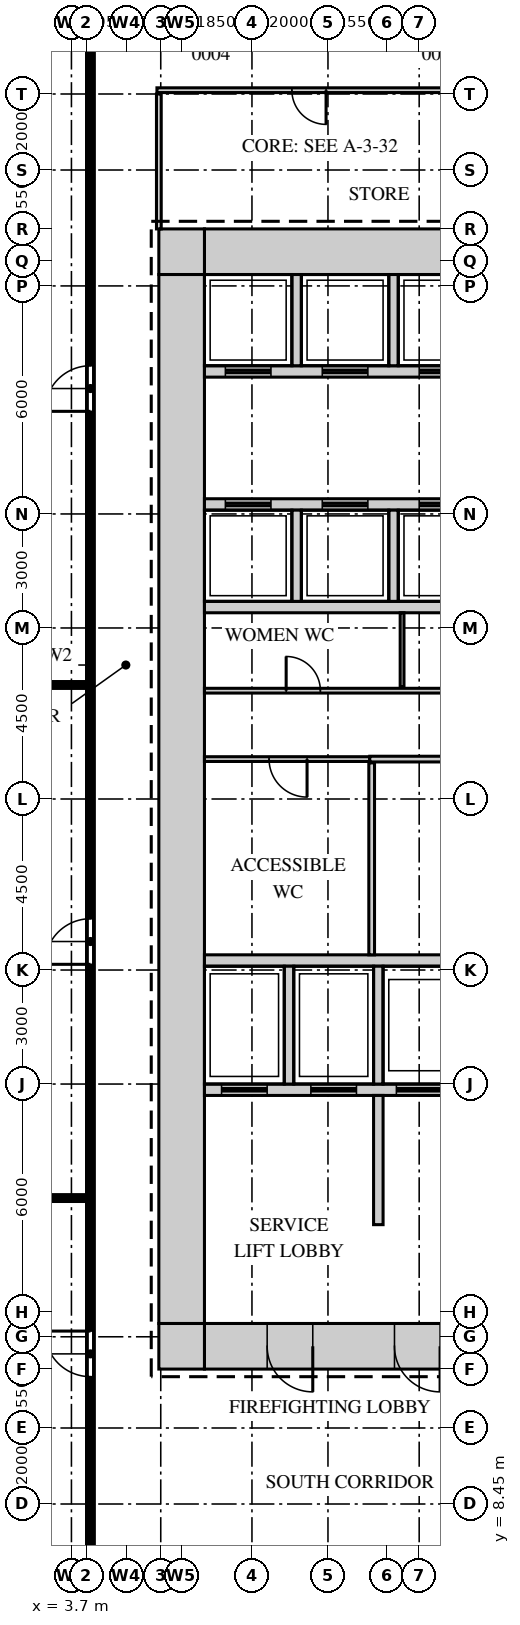
"""IFC4 building model, lengths in metres.
Left out: names, types, materials, properties, quantities, classifications, styles, units other than length and angle.
Written with IfcOpenShell. Run it as: python <this file> out.ifc"""

import sys

from ifc_helpers import new_model, si_unit, direction, frame, frame_2d, origin, place, context, subcontext, project, spatial, rectangle, extrude, source, transform, mapped, element, fill, save


model = new_model("IFC4")
c1 = context("Model", 3, precision=1e-05, world=origin(), true_north=direction((0.0, 1.0)))
c2 = subcontext(c1, "Body", "Model", "MODEL_VIEW")
j1 = project(units=[si_unit("LENGTHUNIT", "METRE"), si_unit("PLANEANGLEUNIT", "RADIAN")], contexts=[c1])
p1 = place(None, origin())
s1 = spatial("IfcSite", under=j1, at=p1, CompositionType="ELEMENT")
p2 = place(p1, origin())
s2 = spatial("IfcBuilding", under=s1, at=p2, CompositionType="ELEMENT")
p3 = place(p2, frame((0.0, 0.0, 7.5)))
s3 = spatial("IfcBuildingStorey", under=s2, at=p3, CompositionType="ELEMENT", Elevation=7.5)
m1 = source(origin(), c2, "Body", "SweptSolid", [
    extrude(rectangle(XDim=6.7, YDim=1.2, at=frame_2d((3.35, 0.0))), origin(), (0.0, 0.0, 1.0), 5.2),
])
p4 = place(p3, frame((7.2, 41.4, 0.0), z_axis=(0.0, 0.0, 1.0), x_axis=(1.0, 0.0, 0.0)))
e1 = element("IfcWall", 1, at=p4, inside=s3, PredefinedType="SHEAR", context=c2, shape_type="MappedRepresentation", body=[
    mapped(m1, transform((0.0, 0.0, 0.0))),
])
m2 = source(origin(), c2, "Body", "SweptSolid", [
    extrude(rectangle(XDim=1.2, YDim=1.2, at=frame_2d((0.6, 0.0))), origin(), (0.0, 0.0, 1.0), 5.2),
])
p5 = place(p3, frame((6.0, 41.4, 0.0), z_axis=(0.0, 0.0, 1.0), x_axis=(1.0, 0.0, 0.0)))
e2 = element("IfcWall", 2, at=p5, inside=s3, PredefinedType="SHEAR", context=c2, shape_type="MappedRepresentation", body=[
    mapped(m2, transform((0.0, 0.0, 0.0))),
])
p6 = place(p3, frame((7.2, 12.6, 0.0), z_axis=(0.0, 0.0, 1.0), x_axis=(1.0, 0.0, 0.0)))
e3 = element("IfcWall", 3, at=p6, inside=s3, PredefinedType="SHEAR", context=c2, shape_type="MappedRepresentation", body=[
    mapped(m1, transform((0.0, 0.0, 0.0))),
])
m3 = source(origin(), c2, "Body", "SweptSolid", [
    extrude(rectangle(XDim=1.2, YDim=2.1, at=frame_2d((0.6, 1.05))), frame((0.0, 0.61, 0.0), z_axis=(0.0, -1.0, 0.0), x_axis=(1.0, 0.0, 0.0)), (0.0, 0.0, 1.0), 1.22),
])
p7 = place(p6, frame((5.0, 0.0, 0.0)))
e4 = element("IfcOpeningElement", 4, at=p7, cuts=e3, PredefinedType="OPENING", context=c2, shape_type="MappedRepresentation", body=[
    mapped(m3, transform((0.0, 0.0, 0.0))),
])
p8 = place(p6, frame((1.65, 0.0, 0.0)))
e5 = element("IfcOpeningElement", 5, at=p8, cuts=e3, PredefinedType="OPENING", context=c2, shape_type="MappedRepresentation", body=[
    mapped(m3, transform((0.0, 0.0, 0.0))),
])
p9 = place(p3, frame((6.0, 12.6, 0.0), z_axis=(0.0, 0.0, 1.0), x_axis=(1.0, 0.0, 0.0)))
e6 = element("IfcWall", 6, at=p9, inside=s3, PredefinedType="SHEAR", context=c2, shape_type="MappedRepresentation", body=[
    mapped(m2, transform((0.0, 0.0, 0.0))),
])
m4 = source(origin(), c2, "Body", "SweptSolid", [
    extrude(rectangle(XDim=27.6, YDim=1.2, at=frame_2d((13.8, 0.0))), origin(), (0.0, 0.0, 1.0), 5.2),
])
p10 = place(p3, frame((6.6, 13.2, 0.0), z_axis=(0.0, 0.0, 1.0), x_axis=(0.0, 1.0, 0.0)))
e7 = element("IfcWall", 7, at=p10, inside=s3, PredefinedType="SHEAR", context=c2, shape_type="MappedRepresentation", body=[
    mapped(m4, transform((0.0, 0.0, 0.0))),
])
m5 = source(origin(), c2, "Body", "SweptSolid", [
    extrude(rectangle(XDim=13.0, YDim=0.3, at=frame_2d((6.5, 0.0))), origin(), (0.0, 0.0, 1.0), 5.2),
])
p11 = place(p3, frame((7.2, 22.75, 0.0), z_axis=(0.0, 0.0, 1.0), x_axis=(1.0, 0.0, 0.0)))
e8 = element("IfcWall", 8, at=p11, inside=s3, PredefinedType="STANDARD", context=c2, shape_type="MappedRepresentation", body=[
    mapped(m5, transform((0.0, 0.0, 0.0))),
])
m6 = source(origin(), c2, "Body", "SweptSolid", [
    extrude(rectangle(XDim=8.875, YDim=0.3, at=frame_2d((4.438, 0.0))), origin(), (0.0, 0.0, 1.0), 5.2),
])
p12 = place(p3, frame((7.2, 19.35, 0.0), z_axis=(0.0, 0.0, 1.0), x_axis=(1.0, 0.0, 0.0)))
e9 = element("IfcWall", 9, at=p12, inside=s3, PredefinedType="STANDARD", context=c2, shape_type="MappedRepresentation", body=[
    mapped(m6, transform((0.0, 0.0, 0.0))),
])
m7 = source(origin(), c2, "Body", "SweptSolid", [
    extrude(rectangle(XDim=1.2, YDim=2.1, at=frame_2d((0.6, 1.05))), frame((0.0, 0.16, 0.0), z_axis=(0.0, -1.0, 0.0), x_axis=(1.0, 0.0, 0.0)), (0.0, 0.0, 1.0), 0.32),
])
p13 = place(p12, frame((0.45, 0.0, 0.0)))
e10 = element("IfcOpeningElement", 10, at=p13, cuts=e9, PredefinedType="OPENING", context=c2, shape_type="MappedRepresentation", body=[
    mapped(m7, transform((0.0, 0.0, 0.0))),
])
p14 = place(p12, frame((2.8, 0.0, 0.0)))
e11 = element("IfcOpeningElement", 11, at=p14, cuts=e9, PredefinedType="OPENING", context=c2, shape_type="MappedRepresentation", body=[
    mapped(m7, transform((0.0, 0.0, 0.0))),
])
p15 = place(p12, frame((5.05, 0.0, 0.0)))
e12 = element("IfcOpeningElement", 12, at=p15, cuts=e9, PredefinedType="OPENING", context=c2, shape_type="MappedRepresentation", body=[
    mapped(m7, transform((0.0, 0.0, 0.0))),
])
p16 = place(p12, frame((7.2, 0.0, 0.0)))
e13 = element("IfcOpeningElement", 13, at=p16, cuts=e9, PredefinedType="OPENING", context=c2, shape_type="MappedRepresentation", body=[
    mapped(m7, transform((0.0, 0.0, 0.0))),
])
m8 = source(origin(), c2, "Body", "SweptSolid", [
    extrude(rectangle(XDim=15.6, YDim=0.3, at=frame_2d((7.8, 0.0))), origin(), (0.0, 0.0, 1.0), 5.2),
])
p17 = place(p3, frame((7.2, 32.05, 0.0), z_axis=(0.0, 0.0, 1.0), x_axis=(1.0, 0.0, 0.0)))
e14 = element("IfcWall", 14, at=p17, inside=s3, PredefinedType="STANDARD", context=c2, shape_type="MappedRepresentation", body=[
    mapped(m8, transform((0.0, 0.0, 0.0))),
])
p18 = place(p3, frame((7.2, 38.25, 0.0), z_axis=(0.0, 0.0, 1.0), x_axis=(1.0, 0.0, 0.0)))
e15 = element("IfcWall", 15, at=p18, inside=s3, PredefinedType="STANDARD", context=c2, shape_type="MappedRepresentation", body=[
    mapped(m8, transform((0.0, 0.0, 0.0))),
])
p19 = place(p18, frame((0.55, 0.0, 0.0)))
e16 = element("IfcOpeningElement", 16, at=p19, cuts=e15, PredefinedType="OPENING", context=c2, shape_type="MappedRepresentation", body=[
    mapped(m7, transform((0.0, 0.0, 0.0))),
])
p20 = place(p18, frame((3.1, 0.0, 0.0)))
e17 = element("IfcOpeningElement", 17, at=p20, cuts=e15, PredefinedType="OPENING", context=c2, shape_type="MappedRepresentation", body=[
    mapped(m7, transform((0.0, 0.0, 0.0))),
])
p21 = place(p18, frame((5.65, 0.0, 0.0)))
e18 = element("IfcOpeningElement", 18, at=p21, cuts=e15, PredefinedType="OPENING", context=c2, shape_type="MappedRepresentation", body=[
    mapped(m7, transform((0.0, 0.0, 0.0))),
])
p22 = place(p18, frame((8.2, 0.0, 0.0)))
e19 = element("IfcOpeningElement", 19, at=p22, cuts=e15, PredefinedType="OPENING", context=c2, shape_type="MappedRepresentation", body=[
    mapped(m7, transform((0.0, 0.0, 0.0))),
])
p23 = place(p3, frame((7.2, 34.75, 0.0), z_axis=(0.0, 0.0, 1.0), x_axis=(1.0, 0.0, 0.0)))
e20 = element("IfcWall", 20, at=p23, inside=s3, PredefinedType="STANDARD", context=c2, shape_type="MappedRepresentation", body=[
    mapped(m8, transform((0.0, 0.0, 0.0))),
])
p24 = place(p23, frame((0.55, 0.0, 0.0)))
e21 = element("IfcOpeningElement", 21, at=p24, cuts=e20, PredefinedType="OPENING", context=c2, shape_type="MappedRepresentation", body=[
    mapped(m7, transform((0.0, 0.0, 0.0))),
])
p25 = place(p23, frame((3.1, 0.0, 0.0)))
e22 = element("IfcOpeningElement", 22, at=p25, cuts=e20, PredefinedType="OPENING", context=c2, shape_type="MappedRepresentation", body=[
    mapped(m7, transform((0.0, 0.0, 0.0))),
])
p26 = place(p23, frame((5.65, 0.0, 0.0)))
e23 = element("IfcOpeningElement", 23, at=p26, cuts=e20, PredefinedType="OPENING", context=c2, shape_type="MappedRepresentation", body=[
    mapped(m7, transform((0.0, 0.0, 0.0))),
])
p27 = place(p23, frame((8.2, 0.0, 0.0)))
e24 = element("IfcOpeningElement", 24, at=p27, cuts=e20, PredefinedType="OPENING", context=c2, shape_type="MappedRepresentation", body=[
    mapped(m7, transform((0.0, 0.0, 0.0))),
])
m9 = source(origin(), c2, "Body", "SweptSolid", [
    extrude(rectangle(XDim=3.1, YDim=0.25, at=frame_2d((1.55, 0.0))), origin(), (0.0, 0.0, 1.0), 5.2),
])
for number, where, z_axis, x_axis in (
    (25, (9.425, 19.5, 0.0), (0.0, 0.0, 1.0), (0.0, 1.0, 0.0)),
    (26, (11.775, 19.5, 0.0), (0.0, 0.0, 1.0), (0.0, 1.0, 0.0)),
):
    element("IfcWall", number, at=place(p3, frame(where, z_axis=z_axis, x_axis=x_axis)), inside=s3, PredefinedType="STANDARD", context=c2, shape_type="MappedRepresentation", body=[
        mapped(m9, transform((0.0, 0.0, 0.0))),
    ])
m10 = source(origin(), c2, "Body", "SweptSolid", [
    extrude(rectangle(XDim=2.4, YDim=0.25, at=frame_2d((1.2, 0.0))), origin(), (0.0, 0.0, 1.0), 5.2),
])
for number, where, z_axis, x_axis in (
    (27, (9.625, 38.4, 0.0), (0.0, 0.0, 1.0), (0.0, 1.0, 0.0)),
    (28, (12.175, 38.4, 0.0), (0.0, 0.0, 1.0), (0.0, 1.0, 0.0)),
    (29, (9.625, 32.2, 0.0), (0.0, 0.0, 1.0), (0.0, 1.0, 0.0)),
    (30, (12.175, 32.2, 0.0), (0.0, 0.0, 1.0), (0.0, 1.0, 0.0)),
):
    element("IfcWall", number, at=place(p3, frame(where, z_axis=z_axis, x_axis=x_axis)), inside=s3, PredefinedType="STANDARD", context=c2, shape_type="MappedRepresentation", body=[
        mapped(m10, transform((0.0, 0.0, 0.0))),
    ])
m11 = source(origin(), c2, "Body", "SweptSolid", [
    extrude(rectangle(XDim=3.4, YDim=0.25, at=frame_2d((1.7, 0.0))), origin(), (0.0, 0.0, 1.0), 5.2),
])
p28 = place(p3, frame((11.775, 15.8, 0.0), z_axis=(0.0, 0.0, 1.0), x_axis=(0.0, 1.0, 0.0)))
e31 = element("IfcWall", 31, at=p28, inside=s3, PredefinedType="STANDARD", context=c2, shape_type="MappedRepresentation", body=[
    mapped(m11, transform((0.0, 0.0, 0.0))),
])
m12 = source(origin(), c2, "Body", "SweptSolid", [
    extrude(rectangle(XDim=41.8, YDim=0.125, at=frame_2d((20.9, 0.0))), origin(), (0.0, 0.0, 1.0), 5.2),
])
p29 = place(p3, frame((4.2, 6.15, 0.0), z_axis=(0.0, 0.0, 1.0), x_axis=(0.0, 1.0, 0.0)))
e32 = element("IfcWall", 32, at=p29, inside=s3, PredefinedType="PARTITIONING", context=c2, shape_type="MappedRepresentation", body=[
    mapped(m12, transform((0.0, 0.0, 0.0))),
])
m13 = source(origin(), c2, "Body", "SweptSolid", [
    extrude(rectangle(XDim=1.2, YDim=2.1, at=frame_2d((0.6, 1.05))), frame((0.0, 0.073, 0.0), z_axis=(0.0, -1.0, 0.0), x_axis=(1.0, 0.0, 0.0)), (0.0, 0.0, 1.0), 0.145),
])
p30 = place(p29, frame((5.65, 0.0, 0.0)))
e33 = element("IfcOpeningElement", 33, at=p30, cuts=e32, PredefinedType="OPENING", context=c2, shape_type="MappedRepresentation", body=[
    mapped(m13, transform((0.0, 0.0, 0.0))),
])
p31 = place(p29, frame((16.5, 0.0, 0.0)))
e34 = element("IfcOpeningElement", 34, at=p31, cuts=e32, PredefinedType="OPENING", context=c2, shape_type="MappedRepresentation", body=[
    mapped(m13, transform((0.0, 0.0, 0.0))),
])
p32 = place(p29, frame((31.05, 0.0, 0.0)))
e35 = element("IfcOpeningElement", 35, at=p32, cuts=e32, PredefinedType="OPENING", context=c2, shape_type="MappedRepresentation", body=[
    mapped(m13, transform((0.0, 0.0, 0.0))),
])
m14 = source(origin(), c2, "Body", "SweptSolid", [
    extrude(rectangle(XDim=12.7, YDim=0.1, at=frame_2d((6.35, 0.0))), origin(), (0.0, 0.0, 1.0), 5.2),
])
p33 = place(p3, frame((-8.6, 16.5, 0.0), z_axis=(0.0, 0.0, 1.0), x_axis=(1.0, 0.0, 0.0)))
e36 = element("IfcWall", 36, at=p33, inside=s3, PredefinedType="PARTITIONING", context=c2, shape_type="MappedRepresentation", body=[
    mapped(m14, transform((0.0, 0.0, 0.0))),
])
m15 = source(origin(), c2, "Body", "SweptSolid", [
    extrude(rectangle(XDim=5.05, YDim=0.15, at=frame_2d((2.525, 0.0))), origin(), (0.0, 0.0, 1.0), 5.2),
])
p34 = place(p3, frame((11.6, 22.9, 0.0), z_axis=(0.0, 0.0, 1.0), x_axis=(0.0, 1.0, 0.0)))
e37 = element("IfcWall", 37, at=p34, inside=s3, PredefinedType="PARTITIONING", context=c2, shape_type="MappedRepresentation", body=[
    mapped(m15, transform((0.0, 0.0, 0.0))),
])
m16 = source(origin(), c2, "Body", "SweptSolid", [
    extrude(rectangle(XDim=4.35, YDim=0.125, at=frame_2d((2.175, 0.0))), origin(), (0.0, 0.0, 1.0), 5.2),
])
p35 = place(p3, frame((7.2, 28.05, 0.0), z_axis=(0.0, 0.0, 1.0), x_axis=(1.0, 0.0, 0.0)))
e38 = element("IfcWall", 38, at=p35, inside=s3, PredefinedType="PARTITIONING", context=c2, shape_type="MappedRepresentation", body=[
    mapped(m16, transform((0.0, 0.0, 0.0))),
])
m17 = source(origin(), c2, "Body", "SweptSolid", [
    extrude(rectangle(XDim=1.0, YDim=2.1, at=frame_2d((0.5, 1.05))), frame((0.0, 0.073, 0.0), z_axis=(0.0, -1.0, 0.0), x_axis=(1.0, 0.0, 0.0)), (0.0, 0.0, 1.0), 0.145),
])
p36 = place(p35, frame((1.7, 0.0, 0.0)))
e39 = element("IfcOpeningElement", 39, at=p36, cuts=e38, PredefinedType="OPENING", context=c2, shape_type="MappedRepresentation", body=[
    mapped(m17, transform((0.0, 0.0, 0.0))),
])
m18 = source(origin(), c2, "Body", "SweptSolid", [
    extrude(rectangle(XDim=6.4, YDim=0.15, at=frame_2d((3.2, 0.0))), origin(), (0.0, 0.0, 1.0), 5.2),
])
p37 = place(p3, frame((11.55, 28.05, 0.0), z_axis=(0.0, 0.0, 1.0), x_axis=(1.0, 0.0, 0.0)))
e40 = element("IfcWall", 40, at=p37, inside=s3, PredefinedType="PARTITIONING", context=c2, shape_type="MappedRepresentation", body=[
    mapped(m18, transform((0.0, 0.0, 0.0))),
])
m19 = source(origin(), c2, "Body", "SweptSolid", [
    extrude(rectangle(XDim=0.9, YDim=2.1, at=frame_2d((0.45, 1.05))), frame((0.0, 0.085, 0.0), z_axis=(0.0, -1.0, 0.0), x_axis=(1.0, 0.0, 0.0)), (0.0, 0.0, 1.0), 0.17),
])
p38 = place(p37, frame((2.75, 0.0, 0.0)))
e41 = element("IfcOpeningElement", 41, at=p38, cuts=e40, PredefinedType="OPENING", context=c2, shape_type="MappedRepresentation", body=[
    mapped(m19, transform((0.0, 0.0, 0.0))),
])
m20 = source(origin(), c2, "Body", "SweptSolid", [
    extrude(rectangle(XDim=15.6, YDim=0.125, at=frame_2d((7.8, 0.0))), origin(), (0.0, 0.0, 1.0), 5.2),
])
p39 = place(p3, frame((7.2, 29.85, 0.0), z_axis=(0.0, 0.0, 1.0), x_axis=(1.0, 0.0, 0.0)))
e42 = element("IfcWall", 42, at=p39, inside=s3, PredefinedType="PARTITIONING", context=c2, shape_type="MappedRepresentation", body=[
    mapped(m20, transform((0.0, 0.0, 0.0))),
])
m21 = source(origin(), c2, "Body", "SweptSolid", [
    extrude(rectangle(XDim=0.9, YDim=2.1, at=frame_2d((0.45, 1.05))), frame((0.0, 0.073, 0.0), z_axis=(0.0, -1.0, 0.0), x_axis=(1.0, 0.0, 0.0)), (0.0, 0.0, 1.0), 0.145),
])
p40 = place(p39, frame((2.15, 0.0, 0.0)))
e43 = element("IfcOpeningElement", 43, at=p40, cuts=e42, PredefinedType="OPENING", context=c2, shape_type="MappedRepresentation", body=[
    mapped(m21, transform((0.0, 0.0, 0.0))),
])
p41 = place(p39, frame((7.35, 0.0, 0.0)))
e44 = element("IfcOpeningElement", 44, at=p41, cuts=e42, PredefinedType="OPENING", context=c2, shape_type="MappedRepresentation", body=[
    mapped(m21, transform((0.0, 0.0, 0.0))),
])
p42 = place(p39, frame((12.55, 0.0, 0.0)))
e45 = element("IfcOpeningElement", 45, at=p42, cuts=e42, PredefinedType="OPENING", context=c2, shape_type="MappedRepresentation", body=[
    mapped(m21, transform((0.0, 0.0, 0.0))),
])
m22 = source(origin(), c2, "Body", "SweptSolid", [
    extrude(rectangle(XDim=1.95, YDim=0.1, at=frame_2d((0.975, 0.0))), origin(), (0.0, 0.0, 1.0), 5.2),
])
p43 = place(p3, frame((12.4, 29.95, 0.0), z_axis=(0.0, 0.0, 1.0), x_axis=(0.0, 1.0, 0.0)))
e46 = element("IfcWall", 46, at=p43, inside=s3, PredefinedType="PARTITIONING", context=c2, shape_type="MappedRepresentation", body=[
    mapped(m22, transform((0.0, 0.0, 0.0))),
])
p44 = place(p3, frame((-8.6, 30.0, 0.0), z_axis=(0.0, 0.0, 1.0), x_axis=(1.0, 0.0, 0.0)))
e47 = element("IfcWall", 47, at=p44, inside=s3, PredefinedType="PARTITIONING", context=c2, shape_type="MappedRepresentation", body=[
    mapped(m14, transform((0.0, 0.0, 0.0))),
])
m23 = source(origin(), c2, "Body", "SweptSolid", [
    extrude(rectangle(XDim=3.55, YDim=0.125, at=frame_2d((1.775, 0.0))), origin(), (0.0, 0.0, 1.0), 5.2),
])
p45 = place(p3, frame((6.0, 42.0, 0.0), z_axis=(0.0, 0.0, 1.0), x_axis=(0.0, 1.0, 0.0)))
e48 = element("IfcWall", 48, at=p45, inside=s3, PredefinedType="PARTITIONING", context=c2, shape_type="MappedRepresentation", body=[
    mapped(m23, transform((0.0, 0.0, 0.0))),
])
m24 = source(origin(), c2, "Body", "SweptSolid", [
    extrude(rectangle(XDim=7.95, YDim=0.125, at=frame_2d((3.975, 0.0))), origin(), (0.0, 0.0, 1.0), 5.2),
])
p46 = place(p3, frame((5.95, 45.65, 0.0), z_axis=(0.0, 0.0, 1.0), x_axis=(1.0, 0.0, 0.0)))
e49 = element("IfcWall", 49, at=p46, inside=s3, PredefinedType="PARTITIONING", context=c2, shape_type="MappedRepresentation", body=[
    mapped(m24, transform((0.0, 0.0, 0.0))),
])
p47 = place(p46, frame((3.55, 0.0, 0.0)))
e50 = element("IfcOpeningElement", 50, at=p47, cuts=e49, PredefinedType="OPENING", context=c2, shape_type="MappedRepresentation", body=[
    mapped(m21, transform((0.0, 0.0, 0.0))),
])
m25 = source(origin(), c2, "Body", "SweptSolid", [
    extrude(rectangle(XDim=0.9, YDim=2.1, at=frame_2d((0.45, 1.05))), frame((0.0, 0.025, 0.0), z_axis=(0.0, -1.0, 0.0), x_axis=(1.0, 0.0, 0.0)), (0.0, 0.0, 1.0), 0.05),
])
p48 = place(p40, origin())
e51 = element("IfcDoor", 51, at=p48, inside=s3, OperationType="SINGLE_SWING_RIGHT", PredefinedType="DOOR", context=c2, shape_type="MappedRepresentation", body=[
    mapped(m25, transform((0.0, 0.0, 0.0))),
])
fill(e43, e51)
m26 = source(origin(), c2, "Body", "SweptSolid", [
    extrude(rectangle(XDim=1.0, YDim=2.1, at=frame_2d((0.5, 1.05))), frame((0.0, 0.025, 0.0), z_axis=(0.0, -1.0, 0.0), x_axis=(1.0, 0.0, 0.0)), (0.0, 0.0, 1.0), 0.05),
])
p49 = place(p36, origin())
e52 = element("IfcDoor", 52, at=p49, inside=s3, OperationType="SINGLE_SWING_RIGHT", PredefinedType="DOOR", context=c2, shape_type="MappedRepresentation", body=[
    mapped(m26, transform((0.0, 0.0, 0.0))),
])
fill(e39, e52)
m27 = source(origin(), c2, "Body", "SweptSolid", [
    extrude(rectangle(XDim=1.2, YDim=2.1, at=frame_2d((0.6, 1.05))), frame((0.0, 0.55, 0.0), z_axis=(0.0, -1.0, 0.0), x_axis=(1.0, 0.0, 0.0)), (0.0, 0.0, 1.0), 1.1),
])
p50 = place(p7, origin())
e53 = element("IfcDoor", 53, at=p50, inside=s3, OperationType="SINGLE_SWING_RIGHT", PredefinedType="DOOR", context=c2, shape_type="MappedRepresentation", body=[
    mapped(m27, transform((0.0, 0.0, 0.0))),
])
fill(e4, e53)
p51 = place(p8, origin())
e54 = element("IfcDoor", 54, at=p51, inside=s3, OperationType="SINGLE_SWING_RIGHT", PredefinedType="DOOR", context=c2, shape_type="MappedRepresentation", body=[
    mapped(m27, transform((0.0, 0.0, 0.0))),
])
fill(e5, e54)
p52 = place(p47, origin())
e55 = element("IfcDoor", 55, at=p52, inside=s3, OperationType="SINGLE_SWING_RIGHT", PredefinedType="DOOR", context=c2, shape_type="MappedRepresentation", body=[
    mapped(m25, transform((0.0, 0.0, 0.0))),
])
fill(e50, e55)
m28 = source(origin(), c2, "Body", "SweptSolid", [
    extrude(rectangle(XDim=1.2, YDim=2.1, at=frame_2d((0.6, 1.05))), frame((0.0, 0.025, 0.0), z_axis=(0.0, -1.0, 0.0), x_axis=(1.0, 0.0, 0.0)), (0.0, 0.0, 1.0), 0.05),
])
p53 = place(p30, origin())
e56 = element("IfcDoor", 56, at=p53, inside=s3, OperationType="SINGLE_SWING_LEFT", PredefinedType="DOOR", context=c2, shape_type="MappedRepresentation", body=[
    mapped(m28, transform((0.0, 0.0, 0.0))),
])
fill(e33, e56)
p54 = place(p31, origin())
e57 = element("IfcDoor", 57, at=p54, inside=s3, OperationType="SINGLE_SWING_RIGHT", PredefinedType="DOOR", context=c2, shape_type="MappedRepresentation", body=[
    mapped(m28, transform((0.0, 0.0, 0.0))),
])
fill(e34, e57)
p55 = place(p32, origin())
e58 = element("IfcDoor", 58, at=p55, inside=s3, OperationType="SINGLE_SWING_RIGHT", PredefinedType="DOOR", context=c2, shape_type="MappedRepresentation", body=[
    mapped(m28, transform((0.0, 0.0, 0.0))),
])
fill(e35, e58)
p56 = place(p24, origin())
e59 = element("IfcDoor", 59, at=p56, inside=s3, OperationType="DOUBLE_DOOR_SLIDING", PredefinedType="DOOR", context=c2, shape_type="MappedRepresentation", body=[
    mapped(m28, transform((0.0, 0.0, 0.0))),
])
fill(e21, e59)
p57 = place(p25, origin())
e60 = element("IfcDoor", 60, at=p57, inside=s3, OperationType="DOUBLE_DOOR_SLIDING", PredefinedType="DOOR", context=c2, shape_type="MappedRepresentation", body=[
    mapped(m28, transform((0.0, 0.0, 0.0))),
])
fill(e22, e60)
p58 = place(p26, origin())
e61 = element("IfcDoor", 61, at=p58, inside=s3, OperationType="DOUBLE_DOOR_SLIDING", PredefinedType="DOOR", context=c2, shape_type="MappedRepresentation", body=[
    mapped(m28, transform((0.0, 0.0, 0.0))),
])
fill(e23, e61)
p59 = place(p19, origin())
e62 = element("IfcDoor", 62, at=p59, inside=s3, OperationType="DOUBLE_DOOR_SLIDING", PredefinedType="DOOR", context=c2, shape_type="MappedRepresentation", body=[
    mapped(m28, transform((0.0, 0.0, 0.0))),
])
fill(e16, e62)
p60 = place(p20, origin())
e63 = element("IfcDoor", 63, at=p60, inside=s3, OperationType="DOUBLE_DOOR_SLIDING", PredefinedType="DOOR", context=c2, shape_type="MappedRepresentation", body=[
    mapped(m28, transform((0.0, 0.0, 0.0))),
])
fill(e17, e63)
p61 = place(p21, origin())
e64 = element("IfcDoor", 64, at=p61, inside=s3, OperationType="DOUBLE_DOOR_SLIDING", PredefinedType="DOOR", context=c2, shape_type="MappedRepresentation", body=[
    mapped(m28, transform((0.0, 0.0, 0.0))),
])
fill(e18, e64)
p62 = place(p13, origin())
e65 = element("IfcDoor", 65, at=p62, inside=s3, OperationType="DOUBLE_DOOR_SLIDING", PredefinedType="DOOR", context=c2, shape_type="MappedRepresentation", body=[
    mapped(m28, transform((0.0, 0.0, 0.0))),
])
fill(e10, e65)
p63 = place(p14, origin())
e66 = element("IfcDoor", 66, at=p63, inside=s3, OperationType="DOUBLE_DOOR_SLIDING", PredefinedType="DOOR", context=c2, shape_type="MappedRepresentation", body=[
    mapped(m28, transform((0.0, 0.0, 0.0))),
])
fill(e11, e66)
p64 = place(p15, origin())
e67 = element("IfcDoor", 67, at=p64, inside=s3, OperationType="DOUBLE_DOOR_SLIDING", PredefinedType="DOOR", context=c2, shape_type="MappedRepresentation", body=[
    mapped(m28, transform((0.0, 0.0, 0.0))),
])
fill(e12, e67)
save(model, sys.argv[1])
